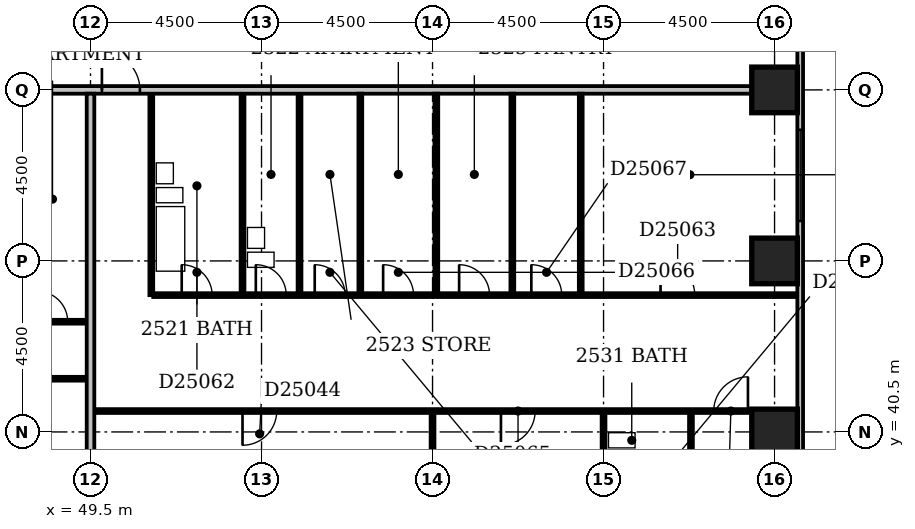
"""IFC4 building model, lengths in metres.
Left out: names, types, materials, properties, quantities, classifications, styles, units other than length and angle.
Written with IfcOpenShell. Run it as: python <this file> out.ifc"""

import sys

from ifc_helpers import new_model, si_unit, direction, frame, frame_2d, origin, origin_2d, place, context, subcontext, project, spatial, rectangle, extrude, element, fill, save


model = new_model("IFC4")
c1 = context("Model", 3, precision=1e-05, world=origin(), true_north=direction((0.0, 1.0)))
c2 = subcontext(c1, "Body", "Model", "MODEL_VIEW")
j1 = project(units=[si_unit("LENGTHUNIT", "METRE"), si_unit("PLANEANGLEUNIT", "RADIAN")], contexts=[c1])
p1 = place(None, origin())
s1 = spatial("IfcSite", under=j1, at=p1, CompositionType="ELEMENT")
p2 = place(p1, origin())
s2 = spatial("IfcBuilding", under=s1, at=p2, CompositionType="ELEMENT")
p3 = place(p2, frame((0.0, 0.0, 101.0)))
s3 = spatial("IfcBuildingStorey", under=s2, at=p3, CompositionType="ELEMENT", Elevation=101.0)
for number, where, z_axis, x_axis in (
    (1, (67.5, 40.5, -0.3), (0.0, 0.0, 1.0), (1.0, 0.0, 0.0)),
    (2, (67.5, 45.0, -0.3), (0.0, 0.0, 1.0), (1.0, 0.0, 0.0)),
    (3, (67.5, 49.5, -0.3), (0.0, 0.0, 1.0), (1.0, 0.0, 0.0)),
):
    element("IfcColumn", number, at=place(p3, frame(where, z_axis=z_axis, x_axis=x_axis)), inside=s3, PredefinedType="COLUMN", context=c2, shape_type="SweptSolid", body=[
        extrude(rectangle(XDim=1.2, YDim=1.2, at=origin_2d()), origin(), (0.0, 0.0, 1.0), 3.6),
    ])
p4 = place(p3, frame((68.175, 35.4, 0.0), z_axis=(0.0, 0.0, 1.0), x_axis=(0.0, 1.0, 0.0)))
e4 = element("IfcWall", 4, at=p4, inside=s3, PredefinedType="STANDARD", context=c2, shape_type="SweptSolid", body=[
    extrude(rectangle(XDim=23.85, YDim=0.15, at=frame_2d((11.925, 0.0))), origin(), (0.0, 0.0, 1.0), 2.7),
])
p5 = place(p4, frame((1.65, 0.0, 0.6)))
e5 = element("IfcOpeningElement", 5, at=p5, cuts=e4, PredefinedType="OPENING", context=c2, shape_type="SweptSolid", body=[
    extrude(rectangle(XDim=2.4, YDim=1.8, at=frame_2d((1.2, 0.9))), frame((0.0, 0.087, 0.0), z_axis=(0.0, -1.0, 0.0), x_axis=(1.0, 0.0, 0.0)), (0.0, 0.0, 1.0), 0.174),
])
p6 = place(p4, frame((10.65, 0.0, 0.6)))
e6 = element("IfcOpeningElement", 6, at=p6, cuts=e4, PredefinedType="OPENING", context=c2, shape_type="SweptSolid", body=[
    extrude(rectangle(XDim=2.4, YDim=1.8, at=frame_2d((1.2, 0.9))), frame((0.0, 0.087, 0.0), z_axis=(0.0, -1.0, 0.0), x_axis=(1.0, 0.0, 0.0)), (0.0, 0.0, 1.0), 0.174),
])
p7 = place(p4, frame((20.653, 0.0, 0.6)))
e7 = element("IfcOpeningElement", 7, at=p7, cuts=e4, PredefinedType="OPENING", context=c2, shape_type="SweptSolid", body=[
    extrude(rectangle(XDim=1.5, YDim=1.8, at=frame_2d((0.75, 0.9))), frame((0.0, 0.087, 0.0), z_axis=(0.0, -1.0, 0.0), x_axis=(1.0, 0.0, 0.0)), (0.0, 0.0, 1.0), 0.174),
])
p8 = place(p3, frame((49.5, 36.6, 0.0), z_axis=(0.0, 0.0, 1.0), x_axis=(0.0, 1.0, 0.0)))
e8 = element("IfcWall", 8, at=p8, inside=s3, PredefinedType="PARTITIONING", context=c2, shape_type="SweptSolid", body=[
    extrude(rectangle(XDim=12.8, YDim=0.2, at=frame_2d((6.4, 0.0))), origin(), (0.0, 0.0, 1.0), 3.3),
])
p9 = place(p3, frame((58.5, 36.6, 0.0), z_axis=(0.0, 0.0, 1.0), x_axis=(0.0, 1.0, 0.0)))
e9 = element("IfcWall", 9, at=p9, inside=s3, PredefinedType="PARTITIONING", context=c2, shape_type="SweptSolid", body=[
    extrude(rectangle(XDim=4.4, YDim=0.1, at=frame_2d((2.2, 0.0))), origin(), (0.0, 0.0, 1.0), 3.3),
])
p10 = place(p3, frame((63.0, 36.6, 0.0), z_axis=(0.0, 0.0, 1.0), x_axis=(0.0, 1.0, 0.0)))
e10 = element("IfcWall", 10, at=p10, inside=s3, PredefinedType="PARTITIONING", context=c2, shape_type="SweptSolid", body=[
    extrude(rectangle(XDim=4.4, YDim=0.1, at=frame_2d((2.2, 0.0))), origin(), (0.0, 0.0, 1.0), 2.4),
])
p11 = place(p3, frame((65.3, 38.15, 0.0), z_axis=(0.0, 0.0, 1.0), x_axis=(0.0, 1.0, 0.0)))
e11 = element("IfcWall", 11, at=p11, inside=s3, PredefinedType="PLUMBINGWALL", context=c2, shape_type="SweptSolid", body=[
    extrude(rectangle(XDim=2.85, YDim=0.1, at=frame_2d((1.425, 0.0))), origin(), (0.0, 0.0, 1.0), 3.3),
])
p12 = place(p11, frame((1.05, 0.0, 0.0)))
e12 = element("IfcOpeningElement", 12, at=p12, cuts=e11, PredefinedType="OPENING", context=c2, shape_type="SweptSolid", body=[
    extrude(rectangle(XDim=0.8, YDim=2.1, at=frame_2d((0.4, 1.05))), frame((0.0, 0.062, 0.0), z_axis=(0.0, -1.0, 0.0), x_axis=(1.0, 0.0, 0.0)), (0.0, 0.0, 1.0), 0.124),
])
p13 = place(p3, frame((49.6, 41.05, 0.0), z_axis=(0.0, 0.0, 1.0), x_axis=(1.0, 0.0, 0.0)))
e13 = element("IfcWall", 13, at=p13, inside=s3, PredefinedType="PARTITIONING", context=c2, shape_type="SweptSolid", body=[
    extrude(rectangle(XDim=17.3, YDim=0.1, at=frame_2d((8.65, 0.0))), origin(), (0.0, 0.0, 1.0), 3.3),
])
p14 = place(p13, frame((3.9, 0.0, 0.0)))
e14 = element("IfcOpeningElement", 14, at=p14, cuts=e13, PredefinedType="OPENING", context=c2, shape_type="SweptSolid", body=[
    extrude(rectangle(XDim=0.9, YDim=2.1, at=frame_2d((0.45, 1.05))), frame((0.0, 0.062, 0.0), z_axis=(0.0, -1.0, 0.0), x_axis=(1.0, 0.0, 0.0)), (0.0, 0.0, 1.0), 0.124),
])
p15 = place(p13, frame((10.7, 0.0, 0.0)))
e15 = element("IfcOpeningElement", 15, at=p15, cuts=e13, PredefinedType="OPENING", context=c2, shape_type="SweptSolid", body=[
    extrude(rectangle(XDim=0.9, YDim=2.1, at=frame_2d((0.45, 1.05))), frame((0.0, 0.062, 0.0), z_axis=(0.0, -1.0, 0.0), x_axis=(1.0, 0.0, 0.0)), (0.0, 0.0, 1.0), 0.124),
])
p16 = place(p13, frame((16.3, 0.0, 0.0)))
e16 = element("IfcOpeningElement", 16, at=p16, cuts=e13, PredefinedType="OPENING", context=c2, shape_type="SweptSolid", body=[
    extrude(rectangle(XDim=0.9, YDim=2.1, at=frame_2d((0.45, 1.05))), frame((0.0, 0.062, 0.0), z_axis=(0.0, -1.0, 0.0), x_axis=(1.0, 0.0, 0.0)), (0.0, 0.0, 1.0), 0.124),
])
p17 = place(p3, frame((36.1, 41.9, 0.0), z_axis=(0.0, 0.0, 1.0), x_axis=(1.0, 0.0, 0.0)))
e17 = element("IfcWall", 17, at=p17, inside=s3, PredefinedType="PARTITIONING", context=c2, shape_type="SweptSolid", body=[
    extrude(rectangle(XDim=13.3, YDim=0.1, at=frame_2d((6.65, 0.0))), origin(), (0.0, 0.0, 1.0), 3.3),
])
p18 = place(p17, frame((1.7, 0.0, 0.0)))
e18 = element("IfcOpeningElement", 18, at=p18, cuts=e17, PredefinedType="OPENING", context=c2, shape_type="SweptSolid", body=[
    extrude(rectangle(XDim=0.9, YDim=2.1, at=frame_2d((0.45, 1.05))), frame((0.0, 0.062, 0.0), z_axis=(0.0, -1.0, 0.0), x_axis=(1.0, 0.0, 0.0)), (0.0, 0.0, 1.0), 0.124),
])
p19 = place(p17, frame((7.35, 0.0, 0.0)))
e19 = element("IfcOpeningElement", 19, at=p19, cuts=e17, PredefinedType="OPENING", context=c2, shape_type="SweptSolid", body=[
    extrude(rectangle(XDim=0.9, YDim=2.1, at=frame_2d((0.45, 1.05))), frame((0.0, 0.062, 0.0), z_axis=(0.0, -1.0, 0.0), x_axis=(1.0, 0.0, 0.0)), (0.0, 0.0, 1.0), 0.124),
])
p20 = place(p17, frame((10.7, 0.0, 0.0)))
e20 = element("IfcOpeningElement", 20, at=p20, cuts=e17, PredefinedType="OPENING", context=c2, shape_type="SweptSolid", body=[
    extrude(rectangle(XDim=0.9, YDim=2.1, at=frame_2d((0.45, 1.05))), frame((0.0, 0.062, 0.0), z_axis=(0.0, -1.0, 0.0), x_axis=(1.0, 0.0, 0.0)), (0.0, 0.0, 1.0), 0.124),
])
p21 = place(p3, frame((37.65, 43.4, 0.0), z_axis=(0.0, 0.0, 1.0), x_axis=(1.0, 0.0, 0.0)))
e21 = element("IfcWall", 21, at=p21, inside=s3, PredefinedType="PARTITIONING", context=c2, shape_type="SweptSolid", body=[
    extrude(rectangle(XDim=11.75, YDim=0.1, at=frame_2d((5.875, 0.0))), origin(), (0.0, 0.0, 1.0), 3.3),
])
p22 = place(p21, frame((6.65, 0.0, 0.0)))
e22 = element("IfcOpeningElement", 22, at=p22, cuts=e21, PredefinedType="OPENING", context=c2, shape_type="SweptSolid", body=[
    extrude(rectangle(XDim=0.8, YDim=2.1, at=frame_2d((0.4, 1.05))), frame((0.0, 0.062, 0.0), z_axis=(0.0, -1.0, 0.0), x_axis=(1.0, 0.0, 0.0)), (0.0, 0.0, 1.0), 0.124),
])
p23 = place(p21, frame((2.45, 0.0, 0.0)))
e23 = element("IfcOpeningElement", 23, at=p23, cuts=e21, PredefinedType="OPENING", context=c2, shape_type="SweptSolid", body=[
    extrude(rectangle(XDim=0.9, YDim=2.1, at=frame_2d((0.45, 1.05))), frame((0.0, 0.062, 0.0), z_axis=(0.0, -1.0, 0.0), x_axis=(1.0, 0.0, 0.0)), (0.0, 0.0, 1.0), 0.124),
])
p24 = place(p21, frame((8.65, 0.0, 0.0)))
e24 = element("IfcOpeningElement", 24, at=p24, cuts=e21, PredefinedType="OPENING", context=c2, shape_type="SweptSolid", body=[
    extrude(rectangle(XDim=0.8, YDim=2.1, at=frame_2d((0.4, 1.05))), frame((0.0, 0.062, 0.0), z_axis=(0.0, -1.0, 0.0), x_axis=(1.0, 0.0, 0.0)), (0.0, 0.0, 1.0), 0.124),
])
p25 = place(p21, frame((10.45, 0.0, 0.0)))
e25 = element("IfcOpeningElement", 25, at=p25, cuts=e21, PredefinedType="OPENING", context=c2, shape_type="SweptSolid", body=[
    extrude(rectangle(XDim=0.8, YDim=2.1, at=frame_2d((0.4, 1.05))), frame((0.0, 0.062, 0.0), z_axis=(0.0, -1.0, 0.0), x_axis=(1.0, 0.0, 0.0)), (0.0, 0.0, 1.0), 0.124),
])
p26 = place(p3, frame((51.1, 44.1, 0.0), z_axis=(0.0, 0.0, 1.0), x_axis=(0.0, 1.0, 0.0)))
e26 = element("IfcWall", 26, at=p26, inside=s3, PredefinedType="PLUMBINGWALL", context=c2, shape_type="SweptSolid", body=[
    extrude(rectangle(XDim=5.3, YDim=0.1, at=frame_2d((2.65, 0.0))), origin(), (0.0, 0.0, 1.0), 3.3),
])
p27 = place(p3, frame((51.15, 44.1, 0.0), z_axis=(0.0, 0.0, 1.0), x_axis=(1.0, 0.0, 0.0)))
e27 = element("IfcWall", 27, at=p27, inside=s3, PredefinedType="PARTITIONING", context=c2, shape_type="SweptSolid", body=[
    extrude(rectangle(XDim=16.95, YDim=0.1, at=frame_2d((8.475, 0.0))), origin(), (0.0, 0.0, 1.0), 3.3),
])
p28 = place(p27, frame((0.75, 0.0, 0.0)))
e28 = element("IfcOpeningElement", 28, at=p28, cuts=e27, PredefinedType="OPENING", context=c2, shape_type="SweptSolid", body=[
    extrude(rectangle(XDim=0.8, YDim=2.1, at=frame_2d((0.4, 1.05))), frame((0.0, 0.062, 0.0), z_axis=(0.0, -1.0, 0.0), x_axis=(1.0, 0.0, 0.0)), (0.0, 0.0, 1.0), 0.124),
])
p29 = place(p27, frame((13.35, 0.0, 0.0)))
e29 = element("IfcOpeningElement", 29, at=p29, cuts=e27, PredefinedType="OPENING", context=c2, shape_type="SweptSolid", body=[
    extrude(rectangle(XDim=0.9, YDim=2.1, at=frame_2d((0.45, 1.05))), frame((0.0, 0.062, 0.0), z_axis=(0.0, -1.0, 0.0), x_axis=(1.0, 0.0, 0.0)), (0.0, 0.0, 1.0), 0.124),
])
p30 = place(p27, frame((8.05, 0.0, 0.0)))
e30 = element("IfcOpeningElement", 30, at=p30, cuts=e27, PredefinedType="OPENING", context=c2, shape_type="SweptSolid", body=[
    extrude(rectangle(XDim=0.8, YDim=2.1, at=frame_2d((0.4, 1.05))), frame((0.0, 0.062, 0.0), z_axis=(0.0, -1.0, 0.0), x_axis=(1.0, 0.0, 0.0)), (0.0, 0.0, 1.0), 0.124),
])
p31 = place(p27, frame((4.25, 0.0, 0.0)))
e31 = element("IfcOpeningElement", 31, at=p31, cuts=e27, PredefinedType="OPENING", context=c2, shape_type="SweptSolid", body=[
    extrude(rectangle(XDim=0.8, YDim=2.1, at=frame_2d((0.4, 1.05))), frame((0.0, 0.062, 0.0), z_axis=(0.0, -1.0, 0.0), x_axis=(1.0, 0.0, 0.0)), (0.0, 0.0, 1.0), 0.124),
])
p32 = place(p27, frame((6.05, 0.0, 0.0)))
e32 = element("IfcOpeningElement", 32, at=p32, cuts=e27, PredefinedType="OPENING", context=c2, shape_type="SweptSolid", body=[
    extrude(rectangle(XDim=0.8, YDim=2.1, at=frame_2d((0.4, 1.05))), frame((0.0, 0.062, 0.0), z_axis=(0.0, -1.0, 0.0), x_axis=(1.0, 0.0, 0.0)), (0.0, 0.0, 1.0), 0.124),
])
p33 = place(p27, frame((9.95, 0.0, 0.0)))
e33 = element("IfcOpeningElement", 33, at=p33, cuts=e27, PredefinedType="OPENING", context=c2, shape_type="SweptSolid", body=[
    extrude(rectangle(XDim=0.8, YDim=2.1, at=frame_2d((0.4, 1.05))), frame((0.0, 0.062, 0.0), z_axis=(0.0, -1.0, 0.0), x_axis=(1.0, 0.0, 0.0)), (0.0, 0.0, 1.0), 0.124),
])
p34 = place(p27, frame((2.7, 0.0, 0.0)))
e34 = element("IfcOpeningElement", 34, at=p34, cuts=e27, PredefinedType="OPENING", context=c2, shape_type="SweptSolid", body=[
    extrude(rectangle(XDim=0.8, YDim=2.1, at=frame_2d((0.4, 1.05))), frame((0.0, 0.062, 0.0), z_axis=(0.0, -1.0, 0.0), x_axis=(1.0, 0.0, 0.0)), (0.0, 0.0, 1.0), 0.124),
])
p35 = place(p3, frame((53.5, 44.15, 0.0), z_axis=(0.0, 0.0, 1.0), x_axis=(0.0, 1.0, 0.0)))
e35 = element("IfcWall", 35, at=p35, inside=s3, PredefinedType="PLUMBINGWALL", context=c2, shape_type="SweptSolid", body=[
    extrude(rectangle(XDim=5.25, YDim=0.1, at=frame_2d((2.625, 0.0))), origin(), (0.0, 0.0, 1.0), 2.6),
])
p36 = place(p3, frame((55.0, 44.15, 0.0), z_axis=(0.0, 0.0, 1.0), x_axis=(0.0, 1.0, 0.0)))
e36 = element("IfcWall", 36, at=p36, inside=s3, PredefinedType="PLUMBINGWALL", context=c2, shape_type="SweptSolid", body=[
    extrude(rectangle(XDim=5.25, YDim=0.1, at=frame_2d((2.625, 0.0))), origin(), (0.0, 0.0, 1.0), 3.3),
])
for number, where, z_axis, x_axis in (
    (37, (56.6, 44.15, 0.0), (0.0, 0.0, 1.0), (0.0, 1.0, 0.0)),
    (38, (58.6, 44.15, 0.0), (0.0, 0.0, 1.0), (0.0, 1.0, 0.0)),
    (39, (60.6, 44.15, 0.0), (0.0, 0.0, 1.0), (0.0, 1.0, 0.0)),
):
    element("IfcWall", number, at=place(p3, frame(where, z_axis=z_axis, x_axis=x_axis)), inside=s3, PredefinedType="PARTITIONING", context=c2, shape_type="SweptSolid", body=[
        extrude(rectangle(XDim=5.25, YDim=0.1, at=frame_2d((2.625, 0.0))), origin(), (0.0, 0.0, 1.0), 3.3),
    ])
p37 = place(p3, frame((62.4, 44.15, 0.0), z_axis=(0.0, 0.0, 1.0), x_axis=(0.0, 1.0, 0.0)))
e40 = element("IfcWall", 40, at=p37, inside=s3, PredefinedType="PARTITIONING", context=c2, shape_type="SweptSolid", body=[
    extrude(rectangle(XDim=5.25, YDim=0.1, at=frame_2d((2.625, 0.0))), origin(), (0.0, 0.0, 1.0), 2.4),
])
p38 = place(p3, frame((9.1, 49.5, 0.0), z_axis=(0.0, 0.0, 1.0), x_axis=(1.0, 0.0, 0.0)))
e41 = element("IfcWall", 41, at=p38, inside=s3, PredefinedType="PARTITIONING", context=c2, shape_type="SweptSolid", body=[
    extrude(rectangle(XDim=57.8, YDim=0.2, at=frame_2d((28.9, 0.0))), origin(), (0.0, 0.0, 1.0), 3.3),
])
p39 = place(p38, frame((14.95, 0.0, 0.0)))
e42 = element("IfcOpeningElement", 42, at=p39, cuts=e41, PredefinedType="OPENING", context=c2, shape_type="SweptSolid", body=[
    extrude(rectangle(XDim=1.0, YDim=2.1, at=frame_2d((0.5, 1.05))), frame((0.0, 0.112, 0.0), z_axis=(0.0, -1.0, 0.0), x_axis=(1.0, 0.0, 0.0)), (0.0, 0.0, 1.0), 0.224),
])
p40 = place(p38, frame((20.6, 0.0, 0.0)))
e43 = element("IfcOpeningElement", 43, at=p40, cuts=e41, PredefinedType="OPENING", context=c2, shape_type="SweptSolid", body=[
    extrude(rectangle(XDim=1.0, YDim=2.1, at=frame_2d((0.5, 1.05))), frame((0.0, 0.112, 0.0), z_axis=(0.0, -1.0, 0.0), x_axis=(1.0, 0.0, 0.0)), (0.0, 0.0, 1.0), 0.224),
])
p41 = place(p38, frame((27.2, 0.0, 0.0)))
e44 = element("IfcOpeningElement", 44, at=p41, cuts=e41, PredefinedType="OPENING", context=c2, shape_type="SweptSolid", body=[
    extrude(rectangle(XDim=1.0, YDim=2.1, at=frame_2d((0.5, 1.05))), frame((0.0, 0.112, 0.0), z_axis=(0.0, -1.0, 0.0), x_axis=(1.0, 0.0, 0.0)), (0.0, 0.0, 1.0), 0.224),
])
p42 = place(p38, frame((40.7, 0.0, 0.0)))
e45 = element("IfcOpeningElement", 45, at=p42, cuts=e41, PredefinedType="OPENING", context=c2, shape_type="SweptSolid", body=[
    extrude(rectangle(XDim=1.0, YDim=2.1, at=frame_2d((0.5, 1.05))), frame((0.0, 0.112, 0.0), z_axis=(0.0, -1.0, 0.0), x_axis=(1.0, 0.0, 0.0)), (0.0, 0.0, 1.0), 0.224),
])
p43 = place(p38, frame((10.65, 0.0, 0.0)))
e46 = element("IfcOpeningElement", 46, at=p43, cuts=e41, PredefinedType="OPENING", context=c2, shape_type="SweptSolid", body=[
    extrude(rectangle(XDim=0.9, YDim=2.1, at=frame_2d((0.45, 1.05))), frame((0.0, 0.112, 0.0), z_axis=(0.0, -1.0, 0.0), x_axis=(1.0, 0.0, 0.0)), (0.0, 0.0, 1.0), 0.224),
])
p44 = place(p6, origin())
e47 = element("IfcWindow", 47, at=p44, inside=s3, PartitioningType="SINGLE_PANEL", PredefinedType="WINDOW", context=c2, shape_type="SweptSolid", body=[
    extrude(rectangle(XDim=2.4, YDim=1.8, at=frame_2d((1.2, 0.9))), frame((0.0, 0.03, 0.0), z_axis=(0.0, -1.0, 0.0), x_axis=(1.0, 0.0, 0.0)), (0.0, 0.0, 1.0), 0.06),
])
fill(e6, e47)
p45 = place(p14, frame((0.9, 0.0, 0.0), z_axis=(0.0, 0.0, 1.0), x_axis=(-1.0, 0.0, 0.0)))
e48 = element("IfcDoor", 48, at=p45, inside=s3, OperationType="SINGLE_SWING_RIGHT", PredefinedType="DOOR", context=c2, shape_type="SweptSolid", body=[
    extrude(rectangle(XDim=0.9, YDim=2.1, at=frame_2d((0.45, 1.05))), frame((0.0, 0.025, 0.0), z_axis=(0.0, -1.0, 0.0), x_axis=(1.0, 0.0, 0.0)), (0.0, 0.0, 1.0), 0.05),
])
fill(e14, e48)
p46 = place(p15, frame((0.9, 0.0, 0.0), z_axis=(0.0, 0.0, 1.0), x_axis=(-1.0, 0.0, 0.0)))
e49 = element("IfcDoor", 49, at=p46, inside=s3, OperationType="SINGLE_SWING_RIGHT", PredefinedType="DOOR", context=c2, shape_type="SweptSolid", body=[
    extrude(rectangle(XDim=0.9, YDim=2.1, at=frame_2d((0.45, 1.05))), frame((0.0, 0.025, 0.0), z_axis=(0.0, -1.0, 0.0), x_axis=(1.0, 0.0, 0.0)), (0.0, 0.0, 1.0), 0.05),
])
fill(e15, e49)
p47 = place(p16, frame((0.9, 0.0, 0.0), z_axis=(0.0, 0.0, 1.0), x_axis=(-1.0, 0.0, 0.0)))
e50 = element("IfcDoor", 50, at=p47, inside=s3, OperationType="SINGLE_SWING_LEFT", PredefinedType="DOOR", context=c2, shape_type="SweptSolid", body=[
    extrude(rectangle(XDim=0.9, YDim=2.1, at=frame_2d((0.45, 1.05))), frame((0.0, 0.025, 0.0), z_axis=(0.0, -1.0, 0.0), x_axis=(1.0, 0.0, 0.0)), (0.0, 0.0, 1.0), 0.05),
])
fill(e16, e50)
p48 = place(p25, origin())
e51 = element("IfcDoor", 51, at=p48, inside=s3, OperationType="SINGLE_SWING_LEFT", PredefinedType="DOOR", context=c2, shape_type="SweptSolid", body=[
    extrude(rectangle(XDim=0.8, YDim=2.1, at=frame_2d((0.4, 1.05))), frame((0.0, 0.025, 0.0), z_axis=(0.0, -1.0, 0.0), x_axis=(1.0, 0.0, 0.0)), (0.0, 0.0, 1.0), 0.05),
])
fill(e25, e51)
p49 = place(p28, origin())
e52 = element("IfcDoor", 52, at=p49, inside=s3, OperationType="SINGLE_SWING_LEFT", PredefinedType="DOOR", context=c2, shape_type="SweptSolid", body=[
    extrude(rectangle(XDim=0.8, YDim=2.1, at=frame_2d((0.4, 1.05))), frame((0.0, 0.025, 0.0), z_axis=(0.0, -1.0, 0.0), x_axis=(1.0, 0.0, 0.0)), (0.0, 0.0, 1.0), 0.05),
])
fill(e28, e52)
p50 = place(p29, origin())
e53 = element("IfcDoor", 53, at=p50, inside=s3, OperationType="SINGLE_SWING_LEFT", PredefinedType="DOOR", context=c2, shape_type="SweptSolid", body=[
    extrude(rectangle(XDim=0.9, YDim=2.1, at=frame_2d((0.45, 1.05))), frame((0.0, 0.025, 0.0), z_axis=(0.0, -1.0, 0.0), x_axis=(1.0, 0.0, 0.0)), (0.0, 0.0, 1.0), 0.05),
])
fill(e29, e53)
p51 = place(p30, origin())
e54 = element("IfcDoor", 54, at=p51, inside=s3, OperationType="SINGLE_SWING_LEFT", PredefinedType="DOOR", context=c2, shape_type="SweptSolid", body=[
    extrude(rectangle(XDim=0.8, YDim=2.1, at=frame_2d((0.4, 1.05))), frame((0.0, 0.025, 0.0), z_axis=(0.0, -1.0, 0.0), x_axis=(1.0, 0.0, 0.0)), (0.0, 0.0, 1.0), 0.05),
])
fill(e30, e54)
p52 = place(p31, origin())
e55 = element("IfcDoor", 55, at=p52, inside=s3, OperationType="SINGLE_SWING_LEFT", PredefinedType="DOOR", context=c2, shape_type="SweptSolid", body=[
    extrude(rectangle(XDim=0.8, YDim=2.1, at=frame_2d((0.4, 1.05))), frame((0.0, 0.025, 0.0), z_axis=(0.0, -1.0, 0.0), x_axis=(1.0, 0.0, 0.0)), (0.0, 0.0, 1.0), 0.05),
])
fill(e31, e55)
p53 = place(p32, origin())
e56 = element("IfcDoor", 56, at=p53, inside=s3, OperationType="SINGLE_SWING_LEFT", PredefinedType="DOOR", context=c2, shape_type="SweptSolid", body=[
    extrude(rectangle(XDim=0.8, YDim=2.1, at=frame_2d((0.4, 1.05))), frame((0.0, 0.025, 0.0), z_axis=(0.0, -1.0, 0.0), x_axis=(1.0, 0.0, 0.0)), (0.0, 0.0, 1.0), 0.05),
])
fill(e32, e56)
p54 = place(p33, origin())
e57 = element("IfcDoor", 57, at=p54, inside=s3, OperationType="SINGLE_SWING_LEFT", PredefinedType="DOOR", context=c2, shape_type="SweptSolid", body=[
    extrude(rectangle(XDim=0.8, YDim=2.1, at=frame_2d((0.4, 1.05))), frame((0.0, 0.025, 0.0), z_axis=(0.0, -1.0, 0.0), x_axis=(1.0, 0.0, 0.0)), (0.0, 0.0, 1.0), 0.05),
])
fill(e33, e57)
p55 = place(p34, origin())
e58 = element("IfcDoor", 58, at=p55, inside=s3, OperationType="SINGLE_SWING_LEFT", PredefinedType="DOOR", context=c2, shape_type="SweptSolid", body=[
    extrude(rectangle(XDim=0.8, YDim=2.1, at=frame_2d((0.4, 1.05))), frame((0.0, 0.025, 0.0), z_axis=(0.0, -1.0, 0.0), x_axis=(1.0, 0.0, 0.0)), (0.0, 0.0, 1.0), 0.05),
])
fill(e34, e58)
p56 = place(p42, origin())
e59 = element("IfcDoor", 59, at=p56, inside=s3, OperationType="SINGLE_SWING_LEFT", PredefinedType="DOOR", context=c2, shape_type="SweptSolid", body=[
    extrude(rectangle(XDim=1.0, YDim=2.1, at=frame_2d((0.5, 1.05))), frame((0.0, 0.025, 0.0), z_axis=(0.0, -1.0, 0.0), x_axis=(1.0, 0.0, 0.0)), (0.0, 0.0, 1.0), 0.05),
])
fill(e45, e59)
save(model, sys.argv[1])
